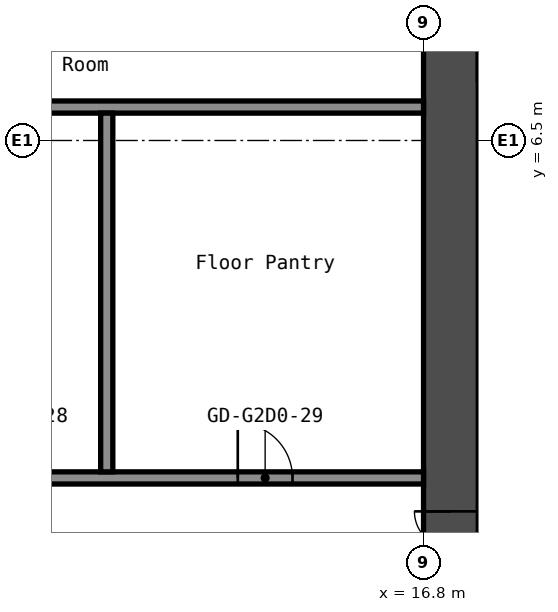
"""IFC4 building model, lengths in metres.
Left out: names, types, materials, properties, quantities, classifications, styles, units other than length and angle.
Written with IfcOpenShell. Run it as: python <this file> out.ifc"""

import sys

from ifc_helpers import new_model, si_unit, direction, frame, frame_2d, origin, place, context, subcontext, project, spatial, rectangle, extrude, element, fill, save


model = new_model("IFC4")
c1 = context("Model", 3, precision=1e-05, world=origin(), true_north=direction((0.0, 1.0)))
c2 = subcontext(c1, "Body", "Model", "MODEL_VIEW")
j1 = project(units=[si_unit("LENGTHUNIT", "METRE"), si_unit("PLANEANGLEUNIT", "RADIAN")], contexts=[c1])
p1 = place(None, origin())
s1 = spatial("IfcSite", under=j1, at=p1, CompositionType="ELEMENT")
p2 = place(p1, origin())
s2 = spatial("IfcBuilding", under=s1, at=p2, CompositionType="ELEMENT")
p3 = place(p2, frame((0.0, 0.0, 85.0)))
s3 = spatial("IfcBuildingStorey", under=s2, at=p3, CompositionType="ELEMENT", Elevation=85.0)
p4 = place(p3, frame((17.25, -8.4, 0.0), z_axis=(0.0, 0.0, 1.0), x_axis=(0.0, 1.0, 0.0)))
e1 = element("IfcWall", 1, at=p4, inside=s3, PredefinedType="SHEAR", context=c2, shape_type="SweptSolid", body=[
    extrude(rectangle(XDim=16.8, YDim=0.9, at=frame_2d((8.4, 0.0))), origin(), (0.0, 0.0, 1.0), 2.8),
])
p5 = place(p4, frame((7.6, 0.0, 0.0)))
e2 = element("IfcOpeningElement", 2, at=p5, cuts=e1, PredefinedType="OPENING", context=c2, shape_type="SweptSolid", body=[
    extrude(rectangle(XDim=1.2, YDim=2.1, at=frame_2d((0.6, 1.05))), frame((0.0, 0.46, 0.0), z_axis=(0.0, -1.0, 0.0), x_axis=(1.0, 0.0, 0.0)), (0.0, 0.0, 1.0), 0.92),
])
p6 = place(p3, frame((17.7, 7.95, 0.0), z_axis=(0.0, 0.0, 1.0), x_axis=(1.0, 0.0, 0.0)))
e3 = element("IfcWall", 3, at=p6, inside=s3, PredefinedType="SHEAR", context=c2, shape_type="SweptSolid", body=[
    extrude(rectangle(XDim=15.0, YDim=0.9, at=frame_2d((7.5, 0.0))), origin(), (0.0, 0.0, 1.0), 2.8),
])
p7 = place(p6, frame((10.4, 0.0, 0.0)))
e4 = element("IfcOpeningElement", 4, at=p7, cuts=e3, PredefinedType="OPENING", context=c2, shape_type="SweptSolid", body=[
    extrude(rectangle(XDim=1.2, YDim=2.1, at=frame_2d((0.6, 1.05))), frame((0.0, 0.46, 0.0), z_axis=(0.0, -1.0, 0.0), x_axis=(1.0, 0.0, 0.0)), (0.0, 0.0, 1.0), 0.92),
])
p8 = place(p6, frame((13.35, 0.0, 0.0)))
e5 = element("IfcOpeningElement", 5, at=p8, cuts=e3, PredefinedType="OPENING", context=c2, shape_type="SweptSolid", body=[
    extrude(rectangle(XDim=0.9, YDim=2.1, at=frame_2d((0.45, 1.05))), frame((0.0, 0.46, 0.0), z_axis=(0.0, -1.0, 0.0), x_axis=(1.0, 0.0, 0.0)), (0.0, 0.0, 1.0), 0.92),
])
p9 = place(p3, frame((-16.8, 0.95, 0.0), z_axis=(0.0, 0.0, 1.0), x_axis=(1.0, 0.0, 0.0)))
e6 = element("IfcWall", 6, at=p9, inside=s3, PredefinedType="PARTITIONING", context=c2, shape_type="SweptSolid", body=[
    extrude(rectangle(XDim=33.6, YDim=0.2, at=frame_2d((16.8, 0.0))), origin(), (0.0, 0.0, 1.0), 2.8),
])
p10 = place(p9, frame((9.715, 0.0, 0.0)))
e7 = element("IfcOpeningElement", 7, at=p10, cuts=e6, PredefinedType="OPENING", context=c2, shape_type="SweptSolid", body=[
    extrude(rectangle(XDim=0.9, YDim=2.1, at=frame_2d((0.45, 1.05))), frame((0.0, 0.11, 0.0), z_axis=(0.0, -1.0, 0.0), x_axis=(1.0, 0.0, 0.0)), (0.0, 0.0, 1.0), 0.22),
])
p11 = place(p9, frame((13.915, 0.0, 0.0)))
e8 = element("IfcOpeningElement", 8, at=p11, cuts=e6, PredefinedType="OPENING", context=c2, shape_type="SweptSolid", body=[
    extrude(rectangle(XDim=0.9, YDim=2.1, at=frame_2d((0.45, 1.05))), frame((0.0, 0.11, 0.0), z_axis=(0.0, -1.0, 0.0), x_axis=(1.0, 0.0, 0.0)), (0.0, 0.0, 1.0), 0.22),
])
p12 = place(p9, frame((26.345, 0.0, 0.0)))
e9 = element("IfcOpeningElement", 9, at=p12, cuts=e6, PredefinedType="OPENING", context=c2, shape_type="SweptSolid", body=[
    extrude(rectangle(XDim=0.9, YDim=2.1, at=frame_2d((0.45, 1.05))), frame((0.0, 0.11, 0.0), z_axis=(0.0, -1.0, 0.0), x_axis=(1.0, 0.0, 0.0)), (0.0, 0.0, 1.0), 0.22),
])
p13 = place(p9, frame((30.545, 0.0, 0.0)))
e10 = element("IfcOpeningElement", 10, at=p13, cuts=e6, PredefinedType="OPENING", context=c2, shape_type="SweptSolid", body=[
    extrude(rectangle(XDim=0.9, YDim=2.1, at=frame_2d((0.45, 1.05))), frame((0.0, 0.11, 0.0), z_axis=(0.0, -1.0, 0.0), x_axis=(1.0, 0.0, 0.0)), (0.0, 0.0, 1.0), 0.22),
])
p14 = place(p3, frame((-16.8, 7.05, 0.0), z_axis=(0.0, 0.0, 1.0), x_axis=(1.0, 0.0, 0.0)))
e11 = element("IfcWall", 11, at=p14, inside=s3, PredefinedType="PARTITIONING", context=c2, shape_type="SweptSolid", body=[
    extrude(rectangle(XDim=33.6, YDim=0.2, at=frame_2d((16.8, 0.0))), origin(), (0.0, 0.0, 1.0), 2.8),
])
p15 = place(p14, frame((1.06, 0.0, 0.0)))
e12 = element("IfcOpeningElement", 12, at=p15, cuts=e11, PredefinedType="OPENING", context=c2, shape_type="SweptSolid", body=[
    extrude(rectangle(XDim=0.9, YDim=2.1, at=frame_2d((0.45, 1.05))), frame((0.0, 0.11, 0.0), z_axis=(0.0, -1.0, 0.0), x_axis=(1.0, 0.0, 0.0)), (0.0, 0.0, 1.0), 0.22),
])
p16 = place(p14, frame((5.26, 0.0, 0.0)))
e13 = element("IfcOpeningElement", 13, at=p16, cuts=e11, PredefinedType="OPENING", context=c2, shape_type="SweptSolid", body=[
    extrude(rectangle(XDim=0.9, YDim=2.1, at=frame_2d((0.45, 1.05))), frame((0.0, 0.11, 0.0), z_axis=(0.0, -1.0, 0.0), x_axis=(1.0, 0.0, 0.0)), (0.0, 0.0, 1.0), 0.22),
])
p17 = place(p14, frame((19.04, 0.0, 0.0)))
e14 = element("IfcOpeningElement", 14, at=p17, cuts=e11, PredefinedType="OPENING", context=c2, shape_type="SweptSolid", body=[
    extrude(rectangle(XDim=0.9, YDim=2.1, at=frame_2d((0.45, 1.05))), frame((0.0, 0.11, 0.0), z_axis=(0.0, -1.0, 0.0), x_axis=(1.0, 0.0, 0.0)), (0.0, 0.0, 1.0), 0.22),
])
p18 = place(p14, frame((23.24, 0.0, 0.0)))
e15 = element("IfcOpeningElement", 15, at=p18, cuts=e11, PredefinedType="OPENING", context=c2, shape_type="SweptSolid", body=[
    extrude(rectangle(XDim=0.9, YDim=2.1, at=frame_2d((0.45, 1.05))), frame((0.0, 0.11, 0.0), z_axis=(0.0, -1.0, 0.0), x_axis=(1.0, 0.0, 0.0)), (0.0, 0.0, 1.0), 0.22),
])
p19 = place(p3, frame((11.59, 1.05, 0.0), z_axis=(0.0, 0.0, 1.0), x_axis=(0.0, 1.0, 0.0)))
e16 = element("IfcWall", 16, at=p19, inside=s3, PredefinedType="PARTITIONING", context=c2, shape_type="SweptSolid", body=[
    extrude(rectangle(XDim=5.9, YDim=0.2, at=frame_2d((2.95, 0.0))), origin(), (0.0, 0.0, 1.0), 2.8),
])
p20 = place(p5, origin())
e17 = element("IfcDoor", 17, at=p20, inside=s3, OperationType="DOUBLE_DOOR_SINGLE_SWING", PredefinedType="DOOR", context=c2, shape_type="SweptSolid", body=[
    extrude(rectangle(XDim=1.2, YDim=2.1, at=frame_2d((0.6, 1.05))), frame((0.0, 0.025, 0.0), z_axis=(0.0, -1.0, 0.0), x_axis=(1.0, 0.0, 0.0)), (0.0, 0.0, 1.0), 0.05),
])
fill(e2, e17)
p21 = place(p13, origin())
e18 = element("IfcDoor", 18, at=p21, inside=s3, OperationType="SINGLE_SWING_RIGHT", PredefinedType="DOOR", context=c2, shape_type="SweptSolid", body=[
    extrude(rectangle(XDim=0.9, YDim=2.1, at=frame_2d((0.45, 1.05))), frame((0.0, 0.025, 0.0), z_axis=(0.0, -1.0, 0.0), x_axis=(1.0, 0.0, 0.0)), (0.0, 0.0, 1.0), 0.05),
])
fill(e10, e18)
save(model, sys.argv[1])
